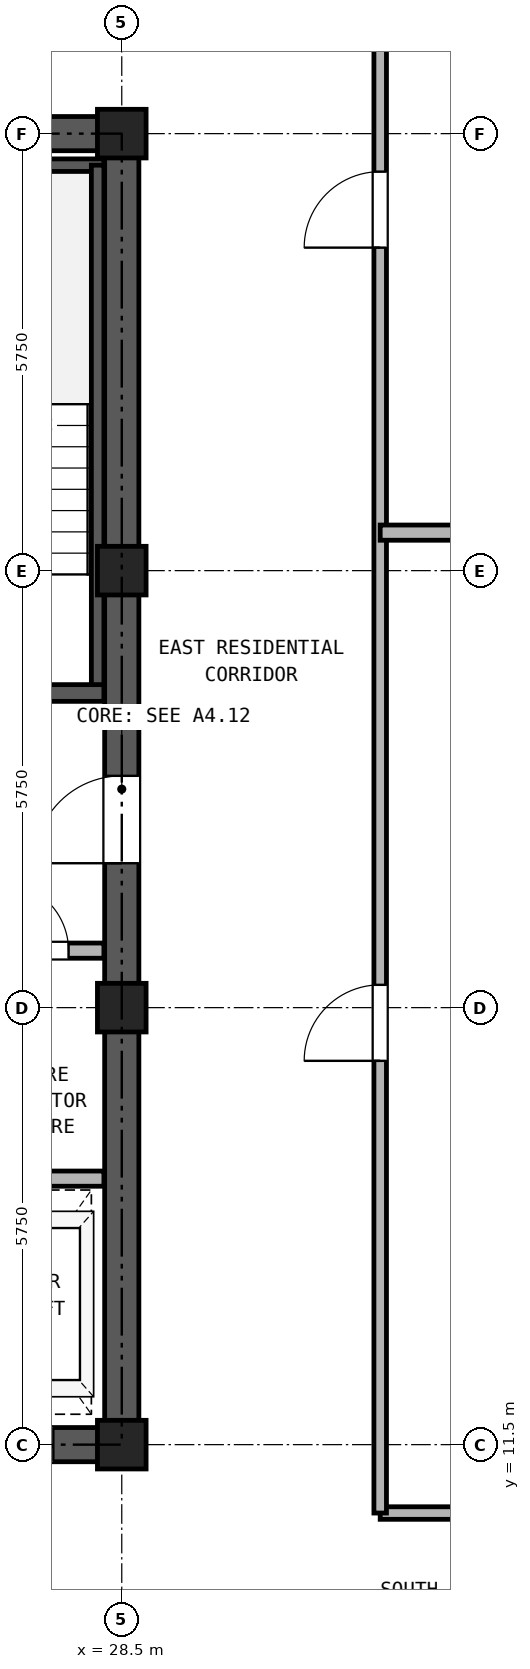
"""IFC4 building model, lengths in metres.
Left out: names, types, materials, properties, quantities, classifications, styles, units other than length and angle.
Written with IfcOpenShell. Run it as: python <this file> out.ifc"""

import sys

from ifc_helpers import new_model, si_unit, direction, frame, frame_2d, origin, origin_2d, place, context, subcontext, project, spatial, rectangle, hollow_rectangle, extrude, source, transform, mapped, element, fill, save


model = new_model("IFC4")
c1 = context("Model", 3, precision=1e-05, world=origin(), true_north=direction((0.0, 1.0)))
c2 = subcontext(c1, "Body", "Model", "MODEL_VIEW")
j1 = project(units=[si_unit("LENGTHUNIT", "METRE"), si_unit("PLANEANGLEUNIT", "RADIAN")], contexts=[c1])
p1 = place(None, origin())
s1 = spatial("IfcSite", under=j1, at=p1, CompositionType="ELEMENT")
p2 = place(p1, origin())
s2 = spatial("IfcBuilding", under=s1, at=p2, CompositionType="ELEMENT")
p3 = place(p2, frame((0.0, 0.0, 193.2)))
s3 = spatial("IfcBuildingStorey", under=s2, at=p3, CompositionType="ELEMENT", Elevation=193.2)
m1 = source(origin(), c2, "Body", "SweptSolid", [
    extrude(hollow_rectangle(XDim=0.64, YDim=0.64, WallThickness=0.035, at=origin_2d()), origin(), (0.0, 0.0, 1.0), 2.95),
])
for number, where, z_axis, x_axis in (
    (1, (28.5, 11.5, 0.0), (0.0, 0.0, 1.0), (1.0, 0.0, 0.0)),
    (2, (28.5, 17.25, 0.0), (0.0, 0.0, 1.0), (1.0, 0.0, 0.0)),
    (3, (28.5, 23.0, 0.0), (0.0, 0.0, 1.0), (1.0, 0.0, 0.0)),
    (4, (28.5, 28.75, 0.0), (0.0, 0.0, 1.0), (1.0, 0.0, 0.0)),
):
    element("IfcColumn", number, at=place(p3, frame(where, z_axis=z_axis, x_axis=x_axis)), inside=s3, PredefinedType="COLUMN", context=c2, shape_type="MappedRepresentation", body=[
        mapped(m1, transform((0.0, 0.0, 0.0), x_axis=(1.0, 0.0, 0.0), y_axis=(0.0, 1.0, 0.0), z_axis=(0.0, 0.0, 1.0), scale=1.0)),
    ])
p4 = place(p3, frame((18.275, 11.5, 0.0), z_axis=(0.0, 0.0, 1.0), x_axis=(1.0, 0.0, 0.0)))
e5 = element("IfcWall", 5, at=p4, inside=s3, PredefinedType="SHEAR", context=c2, shape_type="SweptSolid", body=[
    extrude(rectangle(XDim=10.45, YDim=0.45, at=frame_2d((5.225, 0.0))), origin(), (0.0, 0.0, 1.0), 2.95),
])
p5 = place(p4, frame((1.825, 0.0, 0.0)))
e6 = element("IfcOpeningElement", 6, at=p5, cuts=e5, PredefinedType="OPENING", context=c2, shape_type="SweptSolid", body=[
    extrude(rectangle(XDim=0.95, YDim=2.15, at=frame_2d((0.475, 1.075))), frame((0.0, 0.235, 0.0), z_axis=(0.0, -1.0, 0.0), x_axis=(1.0, 0.0, 0.0)), (0.0, 0.0, 1.0), 0.47),
])
p6 = place(p4, frame((5.325, 0.0, 0.0)))
e7 = element("IfcOpeningElement", 7, at=p6, cuts=e5, PredefinedType="OPENING", context=c2, shape_type="SweptSolid", body=[
    extrude(rectangle(XDim=0.95, YDim=2.15, at=frame_2d((0.475, 1.075))), frame((0.0, 0.235, 0.0), z_axis=(0.0, -1.0, 0.0), x_axis=(1.0, 0.0, 0.0)), (0.0, 0.0, 1.0), 0.47),
])
p7 = place(p4, frame((8.225, 0.0, 0.0)))
e8 = element("IfcOpeningElement", 8, at=p7, cuts=e5, PredefinedType="OPENING", context=c2, shape_type="SweptSolid", body=[
    extrude(rectangle(XDim=1.1, YDim=2.25, at=frame_2d((0.55, 1.125))), frame((0.0, 0.235, 0.0), z_axis=(0.0, -1.0, 0.0), x_axis=(1.0, 0.0, 0.0)), (0.0, 0.0, 1.0), 0.47),
])
p8 = place(p3, frame((18.275, 28.75, 0.0), z_axis=(0.0, 0.0, 1.0), x_axis=(1.0, 0.0, 0.0)))
e9 = element("IfcWall", 9, at=p8, inside=s3, PredefinedType="SHEAR", context=c2, shape_type="SweptSolid", body=[
    extrude(rectangle(XDim=10.45, YDim=0.45, at=frame_2d((5.225, 0.0))), origin(), (0.0, 0.0, 1.0), 2.95),
])
p9 = place(p8, frame((4.105, 0.0, 0.0)))
e10 = element("IfcOpeningElement", 10, at=p9, cuts=e9, PredefinedType="OPENING", context=c2, shape_type="SweptSolid", body=[
    extrude(rectangle(XDim=0.9, YDim=2.05, at=frame_2d((0.45, 1.025))), frame((0.0, 0.235, 0.0), z_axis=(0.0, -1.0, 0.0), x_axis=(1.0, 0.0, 0.0)), (0.0, 0.0, 1.0), 0.47),
])
p10 = place(p8, frame((5.645, 0.0, 0.0)))
e11 = element("IfcOpeningElement", 11, at=p10, cuts=e9, PredefinedType="OPENING", context=c2, shape_type="SweptSolid", body=[
    extrude(rectangle(XDim=0.9, YDim=2.05, at=frame_2d((0.45, 1.025))), frame((0.0, 0.235, 0.0), z_axis=(0.0, -1.0, 0.0), x_axis=(1.0, 0.0, 0.0)), (0.0, 0.0, 1.0), 0.47),
])
p11 = place(p3, frame((28.5, 11.725, 0.0), z_axis=(0.0, 0.0, 1.0), x_axis=(0.0, 1.0, 0.0)))
e12 = element("IfcWall", 12, at=p11, inside=s3, PredefinedType="SHEAR", context=c2, shape_type="SweptSolid", body=[
    extrude(rectangle(XDim=16.8, YDim=0.45, at=frame_2d((8.4, 0.0))), origin(), (0.0, 0.0, 1.0), 2.95),
])
p12 = place(p11, frame((7.425, 0.0, 0.0)))
e13 = element("IfcOpeningElement", 13, at=p12, cuts=e12, PredefinedType="OPENING", context=c2, shape_type="SweptSolid", body=[
    extrude(rectangle(XDim=1.15, YDim=2.2, at=frame_2d((0.575, 1.1))), frame((0.0, 0.235, 0.0), z_axis=(0.0, -1.0, 0.0), x_axis=(1.0, 0.0, 0.0)), (0.0, 0.0, 1.0), 0.47),
])
p13 = place(p3, frame((25.13, 28.335, 0.0), z_axis=(0.0, 0.0, 1.0), x_axis=(1.0, 0.0, 0.0)))
e14 = element("IfcWall", 14, at=p13, inside=s3, PredefinedType="PARTITIONING", context=c2, shape_type="SweptSolid", body=[
    extrude(rectangle(XDim=3.135, YDim=0.165, at=frame_2d((1.567, 0.0))), origin(), (0.0, 0.0, 1.0), 2.95),
])
p14 = place(p3, frame((28.183, 21.39, 0.0), z_axis=(0.0, 0.0, 1.0), x_axis=(0.0, 1.0, 0.0)))
e15 = element("IfcWall", 15, at=p14, inside=s3, PredefinedType="PARTITIONING", context=c2, shape_type="SweptSolid", body=[
    extrude(rectangle(XDim=6.945, YDim=0.165, at=frame_2d((3.473, 0.0))), origin(), (0.0, 0.0, 1.0), 2.95),
])
p15 = place(p3, frame((25.13, 21.39, 0.0), z_axis=(0.0, 0.0, 1.0), x_axis=(1.0, 0.0, 0.0)))
e16 = element("IfcWall", 16, at=p15, inside=s3, PredefinedType="SOLIDWALL", context=c2, shape_type="SweptSolid", body=[
    extrude(rectangle(XDim=3.135, YDim=0.22, at=frame_2d((1.567, 0.0))), origin(), (0.0, 0.0, 1.0), 2.95),
])
p16 = place(p15, frame((0.92, 0.0, 0.0)))
e17 = element("IfcOpeningElement", 17, at=p16, cuts=e16, PredefinedType="OPENING", context=c2, shape_type="SweptSolid", body=[
    extrude(rectangle(XDim=1.15, YDim=2.2, at=frame_2d((0.575, 1.1))), frame((0.0, 0.12, 0.0), z_axis=(0.0, -1.0, 0.0), x_axis=(1.0, 0.0, 0.0)), (0.0, 0.0, 1.0), 0.24),
])
p17 = place(p3, frame((18.735, 18.0, 0.0), z_axis=(0.0, 0.0, 1.0), x_axis=(1.0, 0.0, 0.0)))
e18 = element("IfcWall", 18, at=p17, inside=s3, PredefinedType="PARTITIONING", context=c2, shape_type="SweptSolid", body=[
    extrude(rectangle(XDim=9.53, YDim=0.2, at=frame_2d((4.765, 0.0))), origin(), (0.0, 0.0, 1.0), 2.95),
])
p18 = place(p17, frame((0.515, 0.0, 0.0)))
e19 = element("IfcOpeningElement", 19, at=p18, cuts=e18, PredefinedType="OPENING", context=c2, shape_type="SweptSolid", body=[
    extrude(rectangle(XDim=1.3, YDim=2.3, at=frame_2d((0.65, 1.15))), frame((0.0, 0.11, 0.0), z_axis=(0.0, -1.0, 0.0), x_axis=(1.0, 0.0, 0.0)), (0.0, 0.0, 1.0), 0.22),
])
p19 = place(p17, frame((2.615, 0.0, 0.0)))
e20 = element("IfcOpeningElement", 20, at=p19, cuts=e18, PredefinedType="OPENING", context=c2, shape_type="SweptSolid", body=[
    extrude(rectangle(XDim=1.3, YDim=2.3, at=frame_2d((0.65, 1.15))), frame((0.0, 0.11, 0.0), z_axis=(0.0, -1.0, 0.0), x_axis=(1.0, 0.0, 0.0)), (0.0, 0.0, 1.0), 0.22),
])
p20 = place(p17, frame((5.035, 0.0, 0.0)))
e21 = element("IfcOpeningElement", 21, at=p20, cuts=e18, PredefinedType="OPENING", context=c2, shape_type="SweptSolid", body=[
    extrude(rectangle(XDim=0.9, YDim=2.05, at=frame_2d((0.45, 1.025))), frame((0.0, 0.11, 0.0), z_axis=(0.0, -1.0, 0.0), x_axis=(1.0, 0.0, 0.0)), (0.0, 0.0, 1.0), 0.22),
])
p21 = place(p17, frame((8.165, 0.0, 0.0)))
e22 = element("IfcOpeningElement", 22, at=p21, cuts=e18, PredefinedType="OPENING", context=c2, shape_type="SweptSolid", body=[
    extrude(rectangle(XDim=0.9, YDim=2.05, at=frame_2d((0.45, 1.025))), frame((0.0, 0.11, 0.0), z_axis=(0.0, -1.0, 0.0), x_axis=(1.0, 0.0, 0.0)), (0.0, 0.0, 1.0), 0.22),
])
p22 = place(p3, frame((18.735, 15.0, 0.0), z_axis=(0.0, 0.0, 1.0), x_axis=(1.0, 0.0, 0.0)))
e23 = element("IfcWall", 23, at=p22, inside=s3, PredefinedType="PARTITIONING", context=c2, shape_type="SweptSolid", body=[
    extrude(rectangle(XDim=9.53, YDim=0.2, at=frame_2d((4.765, 0.0))), origin(), (0.0, 0.0, 1.0), 2.95),
])
p23 = place(p3, frame((31.9, 10.6, 0.0), z_axis=(0.0, 0.0, 1.0), x_axis=(1.0, 0.0, 0.0)))
e24 = element("IfcWall", 24, at=p23, inside=s3, PredefinedType="PARTITIONING", context=c2, shape_type="SweptSolid", body=[
    extrude(rectangle(XDim=6.3, YDim=0.165, at=frame_2d((3.15, 0.0))), origin(), (0.0, 0.0, 1.0), 2.95),
])
p24 = place(p3, frame((31.9, 10.6, 0.0), z_axis=(0.0, 0.0, 1.0), x_axis=(0.0, 1.0, 0.0)))
e25 = element("IfcWall", 25, at=p24, inside=s3, PredefinedType="PARTITIONING", context=c2, shape_type="SweptSolid", body=[
    extrude(rectangle(XDim=24.54, YDim=0.165, at=frame_2d((12.27, 0.0))), origin(), (0.0, 0.0, 1.0), 2.95),
])
p25 = place(p24, frame((5.95, 0.0, 0.0)))
e26 = element("IfcOpeningElement", 26, at=p25, cuts=e25, PredefinedType="OPENING", context=c2, shape_type="SweptSolid", body=[
    extrude(rectangle(XDim=1.0, YDim=2.15, at=frame_2d((0.5, 1.075))), frame((0.0, 0.093, 0.0), z_axis=(0.0, -1.0, 0.0), x_axis=(1.0, 0.0, 0.0)), (0.0, 0.0, 1.0), 0.185),
])
p26 = place(p24, frame((16.65, 0.0, 0.0)))
e27 = element("IfcOpeningElement", 27, at=p26, cuts=e25, PredefinedType="OPENING", context=c2, shape_type="SweptSolid", body=[
    extrude(rectangle(XDim=1.0, YDim=2.15, at=frame_2d((0.5, 1.075))), frame((0.0, 0.093, 0.0), z_axis=(0.0, -1.0, 0.0), x_axis=(1.0, 0.0, 0.0)), (0.0, 0.0, 1.0), 0.185),
])
p27 = place(p3, frame((31.9, 23.5, 0.0), z_axis=(0.0, 0.0, 1.0), x_axis=(1.0, 0.0, 0.0)))
e28 = element("IfcWall", 28, at=p27, inside=s3, PredefinedType="PARTITIONING", context=c2, shape_type="SweptSolid", body=[
    extrude(rectangle(XDim=9.74, YDim=0.2, at=frame_2d((4.87, 0.0))), origin(), (0.0, 0.0, 1.0), 2.95),
])
p28 = place(p21, frame((0.9, 0.0, 0.0), z_axis=(0.0, 0.0, 1.0), x_axis=(-1.0, 0.0, 0.0)))
e29 = element("IfcDoor", 29, at=p28, inside=s3, OperationType="SINGLE_SWING_LEFT", PredefinedType="DOOR", context=c2, shape_type="SweptSolid", body=[
    extrude(rectangle(XDim=0.9, YDim=2.05, at=frame_2d((0.45, 1.025))), frame((0.0, 0.025, 0.0), z_axis=(0.0, -1.0, 0.0), x_axis=(1.0, 0.0, 0.0)), (0.0, 0.0, 1.0), 0.05),
])
fill(e22, e29)
p29 = place(p12, origin())
e30 = element("IfcDoor", 30, at=p29, inside=s3, OperationType="SINGLE_SWING_LEFT", PredefinedType="DOOR", context=c2, shape_type="SweptSolid", body=[
    extrude(rectangle(XDim=1.15, YDim=2.2, at=frame_2d((0.575, 1.1))), frame((0.0, 0.025, 0.0), z_axis=(0.0, -1.0, 0.0), x_axis=(1.0, 0.0, 0.0)), (0.0, 0.0, 1.0), 0.05),
])
fill(e13, e30)
p30 = place(p7, frame((1.1, 0.0, 0.0), z_axis=(0.0, 0.0, 1.0), x_axis=(-1.0, 0.0, 0.0)))
e31 = element("IfcDoor", 31, at=p30, inside=s3, OperationType="DOUBLE_DOOR_SLIDING", PredefinedType="DOOR", context=c2, shape_type="SweptSolid", body=[
    extrude(rectangle(XDim=1.1, YDim=2.25, at=frame_2d((0.55, 1.125))), frame((0.0, 0.025, 0.0), z_axis=(0.0, -1.0, 0.0), x_axis=(1.0, 0.0, 0.0)), (0.0, 0.0, 1.0), 0.05),
])
fill(e8, e31)
p31 = place(p25, frame((1.0, 0.0, 0.0), z_axis=(0.0, 0.0, 1.0), x_axis=(-1.0, 0.0, 0.0)))
e32 = element("IfcDoor", 32, at=p31, inside=s3, OperationType="SINGLE_SWING_LEFT", PredefinedType="DOOR", context=c2, shape_type="SweptSolid", body=[
    extrude(rectangle(XDim=1.0, YDim=2.15, at=frame_2d((0.5, 1.075))), frame((0.0, 0.025, 0.0), z_axis=(0.0, -1.0, 0.0), x_axis=(1.0, 0.0, 0.0)), (0.0, 0.0, 1.0), 0.05),
])
fill(e26, e32)
p32 = place(p26, frame((1.0, 0.0, 0.0), z_axis=(0.0, 0.0, 1.0), x_axis=(-1.0, 0.0, 0.0)))
e33 = element("IfcDoor", 33, at=p32, inside=s3, OperationType="SINGLE_SWING_LEFT", PredefinedType="DOOR", context=c2, shape_type="SweptSolid", body=[
    extrude(rectangle(XDim=1.0, YDim=2.15, at=frame_2d((0.5, 1.075))), frame((0.0, 0.025, 0.0), z_axis=(0.0, -1.0, 0.0), x_axis=(1.0, 0.0, 0.0)), (0.0, 0.0, 1.0), 0.05),
])
fill(e27, e33)
save(model, sys.argv[1])
